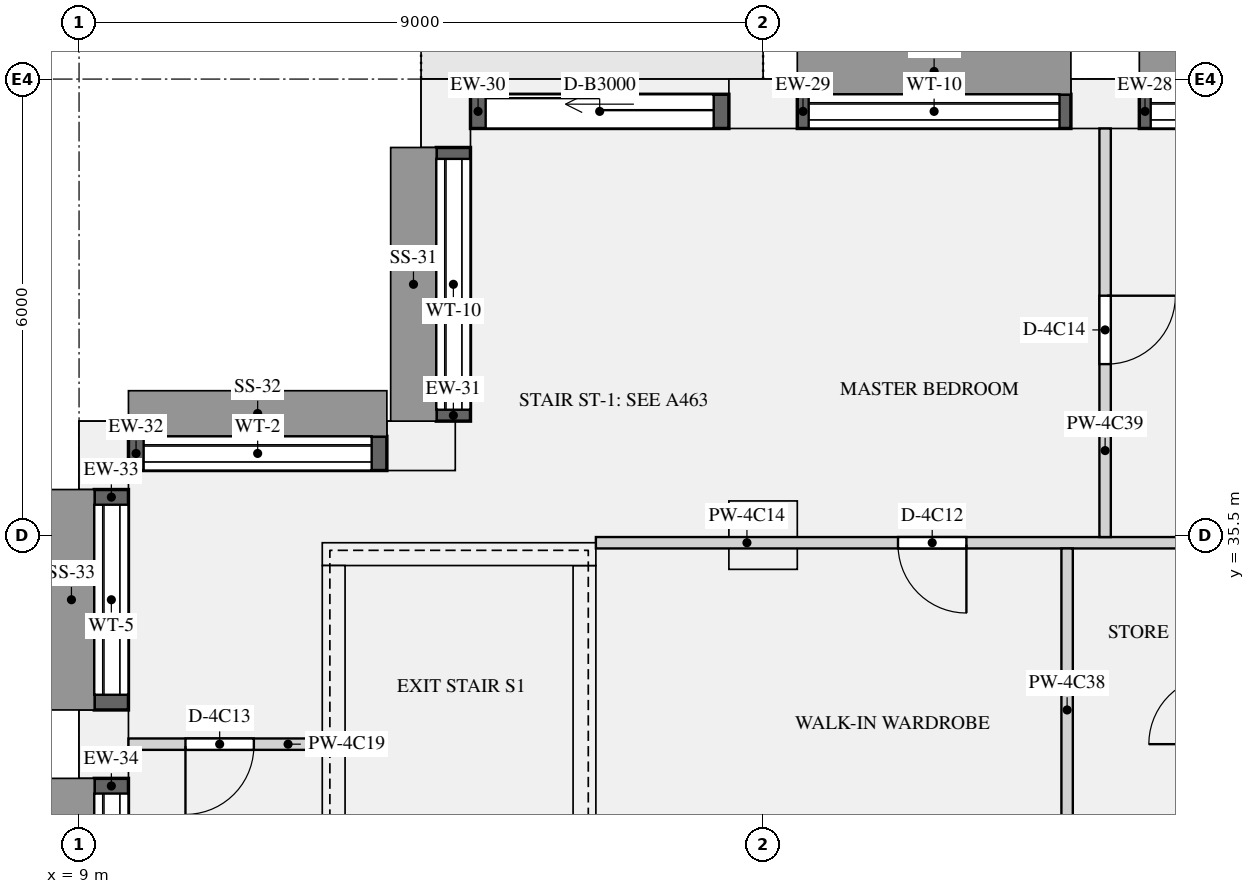
"""IFC4 building model, lengths in metres.
Left out: names, types, materials, properties, quantities, classifications, styles, units other than length and angle.
Written with IfcOpenShell. Run it as: python <this file> out.ifc"""

import sys

from ifc_helpers import new_model, si_unit, direction, frame, frame_2d, origin, origin_2d, place, context, subcontext, project, spatial, rectangle, extrude, element, fill, save


model = new_model("IFC4")
c1 = context("Model", 3, precision=1e-05, world=origin(), true_north=direction((0.0, 1.0)))
c2 = subcontext(c1, "Body", "Model", "MODEL_VIEW")
j1 = project(units=[si_unit("LENGTHUNIT", "METRE"), si_unit("PLANEANGLEUNIT", "RADIAN")], contexts=[c1])
p1 = place(None, origin())
s1 = spatial("IfcSite", under=j1, at=p1, CompositionType="ELEMENT")
p2 = place(p1, origin())
s2 = spatial("IfcBuilding", under=s1, at=p2, CompositionType="ELEMENT")
p3 = place(p2, frame((0.0, 0.0, 216.9)))
s3 = spatial("IfcBuildingStorey", under=s2, at=p3, CompositionType="ELEMENT", Elevation=216.9)
for number, where, z_axis, x_axis in (
    (1, (22.5, 41.175, 0.0), (0.0, 0.0, 1.0), (-1.0, 0.0, 0.0)),
    (2, (18.0, 41.175, 0.0), (0.0, 0.0, 1.0), (-1.0, 0.0, 0.0)),
    (3, (13.825, 41.05, 0.0), (0.0, 0.0, 1.0), (0.0, -1.0, 0.0)),
    (4, (13.5, 36.675, 0.0), (0.0, 0.0, 1.0), (-1.0, 0.0, 0.0)),
    (5, (9.325, 36.55, 0.0), (0.0, 0.0, 1.0), (0.0, -1.0, 0.0)),
    (6, (9.325, 32.75, 0.0), (0.0, 0.0, 1.0), (0.0, -1.0, 0.0)),
):
    element("IfcColumn", number, at=place(p3, frame(where, z_axis=z_axis, x_axis=x_axis)), inside=s3, PredefinedType="USERDEFINED", context=c2, shape_type="SweptSolid", body=[
        extrude(rectangle(XDim=0.9, YDim=0.65, at=origin_2d()), origin(), (0.0, 0.0, 1.0), 3.15),
    ])
p4 = place(p3, frame((18.0, 35.5, 0.0), z_axis=(0.0, 0.0, 1.0), x_axis=(1.0, 0.0, 0.0)))
e7 = element("IfcColumn", 7, at=p4, inside=s3, PredefinedType="COLUMN", context=c2, shape_type="SweptSolid", body=[
    extrude(rectangle(XDim=0.9, YDim=0.9, at=origin_2d()), origin(), (0.0, 0.0, 1.0), 3.15),
])
p5 = place(p3, frame((12.2, 35.25, 0.0), z_axis=(0.0, 0.0, 1.0), x_axis=(1.0, 0.0, 0.0)))
e8 = element("IfcWall", 8, at=p5, inside=s3, PredefinedType="SHEAR", context=c2, shape_type="SweptSolid", body=[
    extrude(rectangle(XDim=3.6, YDim=0.3, at=frame_2d((1.8, 0.0))), origin(), (0.0, 0.0, 1.0), 3.15),
])
for number, where, z_axis, x_axis in (
    (9, (12.35, 27.3, 0.0), (0.0, 0.0, 1.0), (0.0, 1.0, 0.0)),
    (10, (15.65, 27.3, 0.0), (0.0, 0.0, 1.0), (0.0, 1.0, 0.0)),
):
    element("IfcWall", number, at=place(p3, frame(where, z_axis=z_axis, x_axis=x_axis)), inside=s3, PredefinedType="SHEAR", context=c2, shape_type="SweptSolid", body=[
        extrude(rectangle(XDim=7.8, YDim=0.3, at=frame_2d((3.9, 0.0))), origin(), (0.0, 0.0, 1.0), 3.15),
    ])
p6 = place(p3, frame((26.55, 41.075, 0.9), z_axis=(0.0, 0.0, 1.0), x_axis=(-1.0, 0.0, 0.0)))
e11 = element("IfcWall", 11, at=p6, inside=s3, PredefinedType="SOLIDWALL", context=c2, shape_type="SweptSolid", body=[
    extrude(rectangle(XDim=3.6, YDim=0.45, at=frame_2d((1.8, 0.0))), origin(), (0.0, 0.0, 1.0), 1.93),
])
p7 = place(p6, frame((0.15, 0.0, 0.15)))
e12 = element("IfcOpeningElement", 12, at=p7, cuts=e11, PredefinedType="OPENING", context=c2, shape_type="SweptSolid", body=[
    extrude(rectangle(XDim=3.3, YDim=1.5, at=frame_2d((1.65, 0.75))), frame((0.0, 0.235, 0.0), z_axis=(0.0, -1.0, 0.0), x_axis=(1.0, 0.0, 0.0)), (0.0, 0.0, 1.0), 0.47),
])
p8 = place(p3, frame((22.05, 41.075, 0.9), z_axis=(0.0, 0.0, 1.0), x_axis=(-1.0, 0.0, 0.0)))
e13 = element("IfcWall", 13, at=p8, inside=s3, PredefinedType="SOLIDWALL", context=c2, shape_type="SweptSolid", body=[
    extrude(rectangle(XDim=3.6, YDim=0.45, at=frame_2d((1.8, 0.0))), origin(), (0.0, 0.0, 1.0), 1.93),
])
p9 = place(p8, frame((0.15, 0.0, 0.15)))
e14 = element("IfcOpeningElement", 14, at=p9, cuts=e13, PredefinedType="OPENING", context=c2, shape_type="SweptSolid", body=[
    extrude(rectangle(XDim=3.3, YDim=1.5, at=frame_2d((1.65, 0.75))), frame((0.0, 0.235, 0.0), z_axis=(0.0, -1.0, 0.0), x_axis=(1.0, 0.0, 0.0)), (0.0, 0.0, 1.0), 0.47),
])
p10 = place(p3, frame((17.55, 41.075, 0.0), z_axis=(0.0, 0.0, 1.0), x_axis=(-1.0, 0.0, 0.0)))
e15 = element("IfcWall", 15, at=p10, inside=s3, PredefinedType="SOLIDWALL", context=c2, shape_type="SweptSolid", body=[
    extrude(rectangle(XDim=3.4, YDim=0.45, at=frame_2d((1.7, 0.0))), origin(), (0.0, 0.0, 1.0), 2.83),
])
p11 = place(p10, frame((0.2, 0.0, 0.0)))
e16 = element("IfcOpeningElement", 16, at=p11, cuts=e15, PredefinedType="OPENING", context=c2, shape_type="SweptSolid", body=[
    extrude(rectangle(XDim=3.0, YDim=2.3, at=frame_2d((1.5, 1.15))), frame((0.0, 0.235, 0.0), z_axis=(0.0, -1.0, 0.0), x_axis=(1.0, 0.0, 0.0)), (0.0, 0.0, 1.0), 0.47),
])
p12 = place(p3, frame((13.925, 40.6, 0.9), z_axis=(0.0, 0.0, 1.0), x_axis=(0.0, -1.0, 0.0)))
e17 = element("IfcWall", 17, at=p12, inside=s3, PredefinedType="SOLIDWALL", context=c2, shape_type="SweptSolid", body=[
    extrude(rectangle(XDim=3.6, YDim=0.45, at=frame_2d((1.8, 0.0))), origin(), (0.0, 0.0, 1.0), 1.93),
])
p13 = place(p12, frame((0.15, 0.0, 0.15)))
e18 = element("IfcOpeningElement", 18, at=p13, cuts=e17, PredefinedType="OPENING", context=c2, shape_type="SweptSolid", body=[
    extrude(rectangle(XDim=3.3, YDim=1.5, at=frame_2d((1.65, 0.75))), frame((0.0, 0.235, 0.0), z_axis=(0.0, -1.0, 0.0), x_axis=(1.0, 0.0, 0.0)), (0.0, 0.0, 1.0), 0.47),
])
p14 = place(p3, frame((13.05, 36.575, 0.9), z_axis=(0.0, 0.0, 1.0), x_axis=(-1.0, 0.0, 0.0)))
e19 = element("IfcWall", 19, at=p14, inside=s3, PredefinedType="SOLIDWALL", context=c2, shape_type="SweptSolid", body=[
    extrude(rectangle(XDim=3.4, YDim=0.45, at=frame_2d((1.7, 0.0))), origin(), (0.0, 0.0, 1.0), 1.93),
])
p15 = place(p14, frame((0.2, 0.0, 0.15)))
e20 = element("IfcOpeningElement", 20, at=p15, cuts=e19, PredefinedType="OPENING", context=c2, shape_type="SweptSolid", body=[
    extrude(rectangle(XDim=3.0, YDim=1.5, at=frame_2d((1.5, 0.75))), frame((0.0, 0.235, 0.0), z_axis=(0.0, -1.0, 0.0), x_axis=(1.0, 0.0, 0.0)), (0.0, 0.0, 1.0), 0.47),
])
p16 = place(p3, frame((9.425, 36.1, 0.9), z_axis=(0.0, 0.0, 1.0), x_axis=(0.0, -1.0, 0.0)))
e21 = element("IfcWall", 21, at=p16, inside=s3, PredefinedType="SOLIDWALL", context=c2, shape_type="SweptSolid", body=[
    extrude(rectangle(XDim=2.9, YDim=0.45, at=frame_2d((1.45, 0.0))), origin(), (0.0, 0.0, 1.0), 1.93),
])
p17 = place(p16, frame((0.2, 0.0, 0.15)))
e22 = element("IfcOpeningElement", 22, at=p17, cuts=e21, PredefinedType="OPENING", context=c2, shape_type="SweptSolid", body=[
    extrude(rectangle(XDim=2.5, YDim=1.5, at=frame_2d((1.25, 0.75))), frame((0.0, 0.235, 0.0), z_axis=(0.0, -1.0, 0.0), x_axis=(1.0, 0.0, 0.0)), (0.0, 0.0, 1.0), 0.47),
])
p18 = place(p3, frame((9.425, 32.3, 0.9), z_axis=(0.0, 0.0, 1.0), x_axis=(0.0, -1.0, 0.0)))
e23 = element("IfcWall", 23, at=p18, inside=s3, PredefinedType="SOLIDWALL", context=c2, shape_type="SweptSolid", body=[
    extrude(rectangle(XDim=3.15, YDim=0.45, at=frame_2d((1.575, 0.0))), origin(), (0.0, 0.0, 1.0), 1.93),
])
p19 = place(p18, frame((0.2, 0.0, 0.15)))
e24 = element("IfcOpeningElement", 24, at=p19, cuts=e23, PredefinedType="OPENING", context=c2, shape_type="SweptSolid", body=[
    extrude(rectangle(XDim=2.75, YDim=1.5, at=frame_2d((1.375, 0.75))), frame((0.0, 0.235, 0.0), z_axis=(0.0, -1.0, 0.0), x_axis=(1.0, 0.0, 0.0)), (0.0, 0.0, 1.0), 0.47),
])
p20 = place(p3, frame((15.8, 35.4, 0.0), z_axis=(0.0, 0.0, 1.0), x_axis=(1.0, 0.0, 0.0)))
e25 = element("IfcWall", 25, at=p20, inside=s3, PredefinedType="PARTITIONING", context=c2, shape_type="SweptSolid", body=[
    extrude(rectangle(XDim=11.2, YDim=0.15, at=frame_2d((5.6, 0.0))), origin(), (0.0, 0.0, 1.0), 2.83),
])
p21 = place(p20, frame((8.725, 0.0, 0.0)))
e26 = element("IfcOpeningElement", 26, at=p21, cuts=e25, PredefinedType="OPENING", context=c2, shape_type="SweptSolid", body=[
    extrude(rectangle(XDim=1.5, YDim=2.1, at=frame_2d((0.75, 1.05))), frame((0.0, 0.085, 0.0), z_axis=(0.0, -1.0, 0.0), x_axis=(1.0, 0.0, 0.0)), (0.0, 0.0, 1.0), 0.17),
])
p22 = place(p20, frame((3.975, 0.0, 0.0)))
e27 = element("IfcOpeningElement", 27, at=p22, cuts=e25, PredefinedType="OPENING", context=c2, shape_type="SweptSolid", body=[
    extrude(rectangle(XDim=0.9, YDim=2.1, at=frame_2d((0.45, 1.05))), frame((0.0, 0.085, 0.0), z_axis=(0.0, -1.0, 0.0), x_axis=(1.0, 0.0, 0.0)), (0.0, 0.0, 1.0), 0.17),
])
p23 = place(p3, frame((9.65, 32.75, 0.0), z_axis=(0.0, 0.0, 1.0), x_axis=(1.0, 0.0, 0.0)))
e28 = element("IfcWall", 28, at=p23, inside=s3, PredefinedType="PARTITIONING", context=c2, shape_type="SweptSolid", body=[
    extrude(rectangle(XDim=2.55, YDim=0.15, at=frame_2d((1.275, 0.0))), origin(), (0.0, 0.0, 1.0), 2.83),
])
p24 = place(p23, frame((0.75, 0.0, 0.0)))
e29 = element("IfcOpeningElement", 29, at=p24, cuts=e28, PredefinedType="OPENING", context=c2, shape_type="SweptSolid", body=[
    extrude(rectangle(XDim=0.9, YDim=2.1, at=frame_2d((0.45, 1.05))), frame((0.0, 0.085, 0.0), z_axis=(0.0, -1.0, 0.0), x_axis=(1.0, 0.0, 0.0)), (0.0, 0.0, 1.0), 0.17),
])
p25 = place(p3, frame((22.0, 31.075, 0.0), z_axis=(0.0, 0.0, 1.0), x_axis=(0.0, 1.0, 0.0)))
e30 = element("IfcWall", 30, at=p25, inside=s3, PredefinedType="PARTITIONING", context=c2, shape_type="SweptSolid", body=[
    extrude(rectangle(XDim=4.25, YDim=0.15, at=frame_2d((2.125, 0.0))), origin(), (0.0, 0.0, 1.0), 2.83),
])
p26 = place(p3, frame((22.5, 35.475, 0.0), z_axis=(0.0, 0.0, 1.0), x_axis=(0.0, 1.0, 0.0)))
e31 = element("IfcWall", 31, at=p26, inside=s3, PredefinedType="PARTITIONING", context=c2, shape_type="SweptSolid", body=[
    extrude(rectangle(XDim=5.375, YDim=0.15, at=frame_2d((2.688, 0.0))), origin(), (0.0, 0.0, 1.0), 2.83),
])
p27 = place(p26, frame((2.275, 0.0, 0.0)))
e32 = element("IfcOpeningElement", 32, at=p27, cuts=e31, PredefinedType="OPENING", context=c2, shape_type="SweptSolid", body=[
    extrude(rectangle(XDim=0.9, YDim=2.1, at=frame_2d((0.45, 1.05))), frame((0.0, 0.085, 0.0), z_axis=(0.0, -1.0, 0.0), x_axis=(1.0, 0.0, 0.0)), (0.0, 0.0, 1.0), 0.17),
])
p28 = place(p7, origin())
e33 = element("IfcWindow", 33, at=p28, inside=s3, PartitioningType="SINGLE_PANEL", PredefinedType="WINDOW", context=c2, shape_type="SweptSolid", body=[
    extrude(rectangle(XDim=3.3, YDim=1.5, at=frame_2d((1.65, 0.75))), frame((0.0, -0.065, 0.0), z_axis=(0.0, -1.0, 0.0), x_axis=(1.0, 0.0, 0.0)), (0.0, 0.0, 1.0), 0.06),
])
fill(e12, e33)
p29 = place(p9, origin())
e34 = element("IfcWindow", 34, at=p29, inside=s3, PartitioningType="SINGLE_PANEL", PredefinedType="WINDOW", context=c2, shape_type="SweptSolid", body=[
    extrude(rectangle(XDim=3.3, YDim=1.5, at=frame_2d((1.65, 0.75))), frame((0.0, -0.065, 0.0), z_axis=(0.0, -1.0, 0.0), x_axis=(1.0, 0.0, 0.0)), (0.0, 0.0, 1.0), 0.06),
])
fill(e14, e34)
p30 = place(p11, origin())
e35 = element("IfcDoor", 35, at=p30, inside=s3, OperationType="SLIDING_TO_LEFT", PredefinedType="DOOR", context=c2, shape_type="SweptSolid", body=[
    extrude(rectangle(XDim=3.0, YDim=2.3, at=frame_2d((1.5, 1.15))), frame((0.0, -0.07, 0.0), z_axis=(0.0, -1.0, 0.0), x_axis=(1.0, 0.0, 0.0)), (0.0, 0.0, 1.0), 0.05),
])
fill(e16, e35)
p31 = place(p13, origin())
e36 = element("IfcWindow", 36, at=p31, inside=s3, PartitioningType="SINGLE_PANEL", PredefinedType="WINDOW", context=c2, shape_type="SweptSolid", body=[
    extrude(rectangle(XDim=3.3, YDim=1.5, at=frame_2d((1.65, 0.75))), frame((0.0, -0.065, 0.0), z_axis=(0.0, -1.0, 0.0), x_axis=(1.0, 0.0, 0.0)), (0.0, 0.0, 1.0), 0.06),
])
fill(e18, e36)
p32 = place(p15, origin())
e37 = element("IfcWindow", 37, at=p32, inside=s3, PartitioningType="SINGLE_PANEL", PredefinedType="WINDOW", context=c2, shape_type="SweptSolid", body=[
    extrude(rectangle(XDim=3.0, YDim=1.5, at=frame_2d((1.5, 0.75))), frame((0.0, -0.065, 0.0), z_axis=(0.0, -1.0, 0.0), x_axis=(1.0, 0.0, 0.0)), (0.0, 0.0, 1.0), 0.06),
])
fill(e20, e37)
p33 = place(p17, origin())
e38 = element("IfcWindow", 38, at=p33, inside=s3, PartitioningType="SINGLE_PANEL", PredefinedType="WINDOW", context=c2, shape_type="SweptSolid", body=[
    extrude(rectangle(XDim=2.5, YDim=1.5, at=frame_2d((1.25, 0.75))), frame((0.0, -0.065, 0.0), z_axis=(0.0, -1.0, 0.0), x_axis=(1.0, 0.0, 0.0)), (0.0, 0.0, 1.0), 0.06),
])
fill(e22, e38)
p34 = place(p19, origin())
e39 = element("IfcWindow", 39, at=p34, inside=s3, PartitioningType="SINGLE_PANEL", PredefinedType="WINDOW", context=c2, shape_type="SweptSolid", body=[
    extrude(rectangle(XDim=2.75, YDim=1.5, at=frame_2d((1.375, 0.75))), frame((0.0, -0.065, 0.0), z_axis=(0.0, -1.0, 0.0), x_axis=(1.0, 0.0, 0.0)), (0.0, 0.0, 1.0), 0.06),
])
fill(e24, e39)
p35 = place(p22, frame((0.9, 0.0, 0.0), z_axis=(0.0, 0.0, 1.0), x_axis=(-1.0, 0.0, 0.0)))
e40 = element("IfcDoor", 40, at=p35, inside=s3, OperationType="SINGLE_SWING_LEFT", PredefinedType="DOOR", context=c2, shape_type="SweptSolid", body=[
    extrude(rectangle(XDim=0.9, YDim=2.1, at=frame_2d((0.45, 1.05))), frame((0.0, 0.025, 0.0), z_axis=(0.0, -1.0, 0.0), x_axis=(1.0, 0.0, 0.0)), (0.0, 0.0, 1.0), 0.05),
])
fill(e27, e40)
p36 = place(p24, frame((0.9, 0.0, 0.0), z_axis=(0.0, 0.0, 1.0), x_axis=(-1.0, 0.0, 0.0)))
e41 = element("IfcDoor", 41, at=p36, inside=s3, OperationType="SINGLE_SWING_RIGHT", PredefinedType="DOOR", context=c2, shape_type="SweptSolid", body=[
    extrude(rectangle(XDim=0.9, YDim=2.1, at=frame_2d((0.45, 1.05))), frame((0.0, 0.025, 0.0), z_axis=(0.0, -1.0, 0.0), x_axis=(1.0, 0.0, 0.0)), (0.0, 0.0, 1.0), 0.05),
])
fill(e29, e41)
p37 = place(p27, frame((0.9, 0.0, 0.0), z_axis=(0.0, 0.0, 1.0), x_axis=(-1.0, 0.0, 0.0)))
e42 = element("IfcDoor", 42, at=p37, inside=s3, OperationType="SINGLE_SWING_LEFT", PredefinedType="DOOR", context=c2, shape_type="SweptSolid", body=[
    extrude(rectangle(XDim=0.9, YDim=2.1, at=frame_2d((0.45, 1.05))), frame((0.0, 0.025, 0.0), z_axis=(0.0, -1.0, 0.0), x_axis=(1.0, 0.0, 0.0)), (0.0, 0.0, 1.0), 0.05),
])
fill(e32, e42)
save(model, sys.argv[1])
